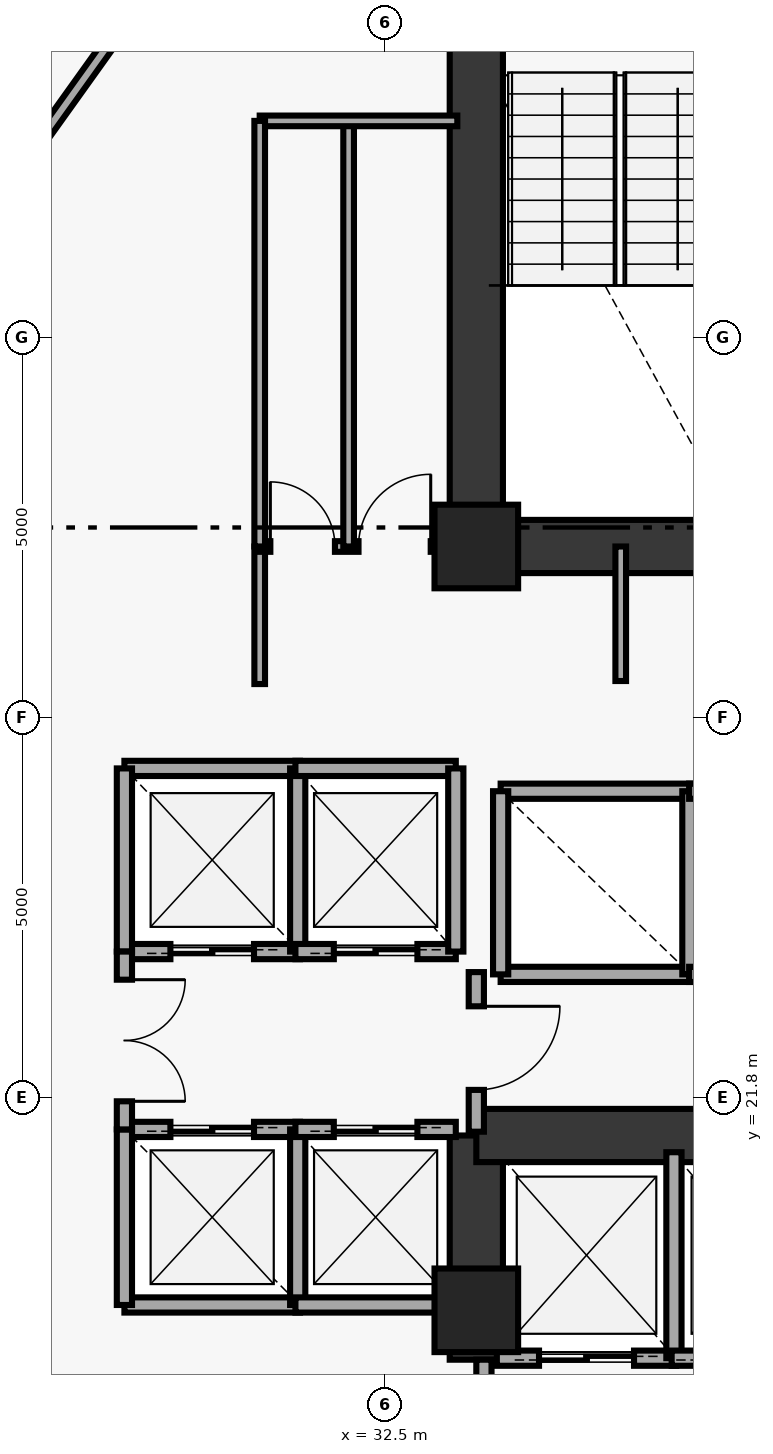
"""IFC4 building model, lengths in metres.
Left out: names, types, materials, properties, quantities, classifications, styles, units other than length and angle.
Written with IfcOpenShell. Run it as: python <this file> out.ifc"""

import sys

from ifc_helpers import new_model, si_unit, direction, frame, frame_2d, origin, origin_2d, place, context, subcontext, project, spatial, rectangle, extrude, element, fill, save


model = new_model("IFC4")
c1 = context("Model", 3, precision=1e-05, world=origin(), true_north=direction((0.0, 1.0)))
c2 = subcontext(c1, "Body", "Model", "MODEL_VIEW")
j1 = project(units=[si_unit("LENGTHUNIT", "METRE"), si_unit("PLANEANGLEUNIT", "RADIAN")], contexts=[c1])
p1 = place(None, origin())
s1 = spatial("IfcSite", under=j1, at=p1, CompositionType="ELEMENT")
p2 = place(p1, origin())
s2 = spatial("IfcBuilding", under=s1, at=p2, CompositionType="ELEMENT")
p3 = place(p2, frame((0.0, 0.0, 106.05)))
s3 = spatial("IfcBuildingStorey", under=s2, at=p3, CompositionType="ELEMENT", Elevation=106.05)
for number, where, z_axis, x_axis in (
    (1, (33.7, 19.0, 0.0), (0.0, 0.0, 1.0), (1.0, 0.0, 0.0)),
    (2, (33.7, 29.05, 0.0), (0.0, 0.0, 1.0), (1.0, 0.0, 0.0)),
):
    element("IfcColumn", number, at=place(p3, frame(where, z_axis=z_axis, x_axis=x_axis)), inside=s3, PredefinedType="PILASTER", context=c2, shape_type="SweptSolid", body=[
        extrude(rectangle(XDim=1.1, YDim=1.1, at=origin_2d()), origin(), (0.0, 0.0, 1.0), 6.88),
    ])
p4 = place(p3, frame((33.7, 29.05, 0.0), z_axis=(0.0, 0.0, 1.0), x_axis=(0.0, 1.0, 0.0)))
e3 = element("IfcWall", 3, at=p4, inside=s3, PredefinedType="SHEAR", context=c2, shape_type="SweptSolid", body=[
    extrude(rectangle(XDim=8.35, YDim=0.7, at=frame_2d((4.175, 0.0))), origin(), (0.0, 0.0, 1.0), 6.88),
])
p5 = place(p3, frame((33.7, 18.35, 0.0), z_axis=(0.0, 0.0, 1.0), x_axis=(0.0, 1.0, 0.0)))
e4 = element("IfcWall", 4, at=p5, inside=s3, PredefinedType="SHEAR", context=c2, shape_type="SweptSolid", body=[
    extrude(rectangle(XDim=2.95, YDim=0.7, at=frame_2d((1.475, 0.0))), origin(), (0.0, 0.0, 1.0), 6.88),
])
p6 = place(p3, frame((33.7, 29.05, 0.0), z_axis=(0.0, 0.0, 1.0), x_axis=(1.0, 0.0, 0.0)))
e5 = element("IfcWall", 5, at=p6, inside=s3, PredefinedType="SHEAR", context=c2, shape_type="SweptSolid", body=[
    extrude(rectangle(XDim=10.6, YDim=0.7, at=frame_2d((5.3, 0.0))), origin(), (0.0, 0.0, 1.0), 6.88),
])
p7 = place(p3, frame((33.7, 21.3, 0.0), z_axis=(0.0, 0.0, 1.0), x_axis=(1.0, 0.0, 0.0)))
e6 = element("IfcWall", 6, at=p7, inside=s3, PredefinedType="SHEAR", context=c2, shape_type="SweptSolid", body=[
    extrude(rectangle(XDim=7.55, YDim=0.7, at=frame_2d((3.775, 0.0))), origin(), (0.0, 0.0, 1.0), 6.88),
])
p8 = place(p3, frame((35.6, 27.28, 0.0), z_axis=(0.0, 0.0, 1.0), x_axis=(0.0, 1.0, 0.0)))
e7 = element("IfcWall", 7, at=p8, inside=s3, PredefinedType="PARTITIONING", context=c2, shape_type="SweptSolid", body=[
    extrude(rectangle(XDim=1.77, YDim=0.14, at=frame_2d((0.885, 0.0))), origin(), (0.0, 0.0, 1.0), 6.88),
])
p9 = place(p3, frame((29.07, 23.72, 0.0), z_axis=(0.0, 0.0, 1.0), x_axis=(1.0, 0.0, 0.0)))
e8 = element("IfcWall", 8, at=p9, inside=s3, PredefinedType="SOLIDWALL", context=c2, shape_type="SweptSolid", body=[
    extrude(rectangle(XDim=2.31, YDim=0.2, at=frame_2d((1.155, 0.0))), origin(), (0.0, 0.0, 1.0), 6.88),
])
p10 = place(p9, frame((0.605, 0.0, 0.0)))
e9 = element("IfcOpeningElement", 9, at=p10, cuts=e8, PredefinedType="OPENING", context=c2, shape_type="SweptSolid", body=[
    extrude(rectangle(XDim=1.1, YDim=2.15, at=frame_2d((0.55, 1.075))), frame((0.0, 0.11, 0.0), z_axis=(0.0, -1.0, 0.0), x_axis=(1.0, 0.0, 0.0)), (0.0, 0.0, 1.0), 0.22),
])
p11 = place(p3, frame((29.07, 26.13, 0.0), z_axis=(0.0, 0.0, 1.0), x_axis=(1.0, 0.0, 0.0)))
e10 = element("IfcWall", 10, at=p11, inside=s3, PredefinedType="SOLIDWALL", context=c2, shape_type="SweptSolid", body=[
    extrude(rectangle(XDim=2.31, YDim=0.2, at=frame_2d((1.155, 0.0))), origin(), (0.0, 0.0, 1.0), 6.88),
])
for number, where, z_axis, x_axis in (
    (11, (29.07, 23.72, 0.0), (0.0, 0.0, 1.0), (0.0, 1.0, 0.0)),
    (12, (31.35, 23.72, 0.0), (0.0, 0.0, 1.0), (0.0, 1.0, 0.0)),
):
    element("IfcWall", number, at=place(p3, frame(where, z_axis=z_axis, x_axis=x_axis)), inside=s3, PredefinedType="SOLIDWALL", context=c2, shape_type="SweptSolid", body=[
        extrude(rectangle(XDim=2.41, YDim=0.2, at=frame_2d((1.205, 0.0))), origin(), (0.0, 0.0, 1.0), 6.88),
    ])
p12 = place(p3, frame((31.32, 23.72, 0.0), z_axis=(0.0, 0.0, 1.0), x_axis=(1.0, 0.0, 0.0)))
e13 = element("IfcWall", 13, at=p12, inside=s3, PredefinedType="SOLIDWALL", context=c2, shape_type="SweptSolid", body=[
    extrude(rectangle(XDim=2.11, YDim=0.2, at=frame_2d((1.055, 0.0))), origin(), (0.0, 0.0, 1.0), 6.88),
])
p13 = place(p12, frame((0.505, 0.0, 0.0)))
e14 = element("IfcOpeningElement", 14, at=p13, cuts=e13, PredefinedType="OPENING", context=c2, shape_type="SweptSolid", body=[
    extrude(rectangle(XDim=1.1, YDim=2.15, at=frame_2d((0.55, 1.075))), frame((0.0, 0.11, 0.0), z_axis=(0.0, -1.0, 0.0), x_axis=(1.0, 0.0, 0.0)), (0.0, 0.0, 1.0), 0.22),
])
p14 = place(p3, frame((31.32, 26.13, 0.0), z_axis=(0.0, 0.0, 1.0), x_axis=(1.0, 0.0, 0.0)))
e15 = element("IfcWall", 15, at=p14, inside=s3, PredefinedType="SOLIDWALL", context=c2, shape_type="SweptSolid", body=[
    extrude(rectangle(XDim=2.11, YDim=0.2, at=frame_2d((1.055, 0.0))), origin(), (0.0, 0.0, 1.0), 6.88),
])
p15 = place(p3, frame((33.43, 23.72, 0.0), z_axis=(0.0, 0.0, 1.0), x_axis=(0.0, 1.0, 0.0)))
e16 = element("IfcWall", 16, at=p15, inside=s3, PredefinedType="SOLIDWALL", context=c2, shape_type="SweptSolid", body=[
    extrude(rectangle(XDim=2.41, YDim=0.2, at=frame_2d((1.205, 0.0))), origin(), (0.0, 0.0, 1.0), 6.88),
])
p16 = place(p3, frame((29.07, 19.07, 0.0), z_axis=(0.0, 0.0, 1.0), x_axis=(1.0, 0.0, 0.0)))
e17 = element("IfcWall", 17, at=p16, inside=s3, PredefinedType="SOLIDWALL", context=c2, shape_type="SweptSolid", body=[
    extrude(rectangle(XDim=2.31, YDim=0.2, at=frame_2d((1.155, 0.0))), origin(), (0.0, 0.0, 1.0), 6.88),
])
p17 = place(p3, frame((29.07, 21.38, 0.0), z_axis=(0.0, 0.0, 1.0), x_axis=(1.0, 0.0, 0.0)))
e18 = element("IfcWall", 18, at=p17, inside=s3, PredefinedType="SOLIDWALL", context=c2, shape_type="SweptSolid", body=[
    extrude(rectangle(XDim=2.31, YDim=0.2, at=frame_2d((1.155, 0.0))), origin(), (0.0, 0.0, 1.0), 6.88),
])
p18 = place(p17, frame((0.605, 0.0, 0.0)))
e19 = element("IfcOpeningElement", 19, at=p18, cuts=e18, PredefinedType="OPENING", context=c2, shape_type="SweptSolid", body=[
    extrude(rectangle(XDim=1.1, YDim=2.15, at=frame_2d((0.55, 1.075))), frame((0.0, 0.11, 0.0), z_axis=(0.0, -1.0, 0.0), x_axis=(1.0, 0.0, 0.0)), (0.0, 0.0, 1.0), 0.22),
])
for number, where, z_axis, x_axis in (
    (20, (29.07, 19.07, 0.0), (0.0, 0.0, 1.0), (0.0, 1.0, 0.0)),
    (21, (31.35, 19.07, 0.0), (0.0, 0.0, 1.0), (0.0, 1.0, 0.0)),
):
    element("IfcWall", number, at=place(p3, frame(where, z_axis=z_axis, x_axis=x_axis)), inside=s3, PredefinedType="SOLIDWALL", context=c2, shape_type="SweptSolid", body=[
        extrude(rectangle(XDim=2.31, YDim=0.2, at=frame_2d((1.155, 0.0))), origin(), (0.0, 0.0, 1.0), 6.88),
    ])
p19 = place(p3, frame((31.32, 19.07, 0.0), z_axis=(0.0, 0.0, 1.0), x_axis=(1.0, 0.0, 0.0)))
e22 = element("IfcWall", 22, at=p19, inside=s3, PredefinedType="SOLIDWALL", context=c2, shape_type="SweptSolid", body=[
    extrude(rectangle(XDim=2.11, YDim=0.2, at=frame_2d((1.055, 0.0))), origin(), (0.0, 0.0, 1.0), 6.88),
])
p20 = place(p3, frame((31.32, 21.38, 0.0), z_axis=(0.0, 0.0, 1.0), x_axis=(1.0, 0.0, 0.0)))
e23 = element("IfcWall", 23, at=p20, inside=s3, PredefinedType="SOLIDWALL", context=c2, shape_type="SweptSolid", body=[
    extrude(rectangle(XDim=2.11, YDim=0.2, at=frame_2d((1.055, 0.0))), origin(), (0.0, 0.0, 1.0), 6.88),
])
p21 = place(p20, frame((0.505, 0.0, 0.0)))
e24 = element("IfcOpeningElement", 24, at=p21, cuts=e23, PredefinedType="OPENING", context=c2, shape_type="SweptSolid", body=[
    extrude(rectangle(XDim=1.1, YDim=2.15, at=frame_2d((0.55, 1.075))), frame((0.0, 0.11, 0.0), z_axis=(0.0, -1.0, 0.0), x_axis=(1.0, 0.0, 0.0)), (0.0, 0.0, 1.0), 0.22),
])
for number, where, z_axis, x_axis in (
    (25, (34.02, 23.42, 0.0), (0.0, 0.0, 1.0), (1.0, 0.0, 0.0)),
    (26, (34.02, 25.83, 0.0), (0.0, 0.0, 1.0), (1.0, 0.0, 0.0)),
):
    element("IfcWall", number, at=place(p3, frame(where, z_axis=z_axis, x_axis=x_axis)), inside=s3, PredefinedType="SOLIDWALL", context=c2, shape_type="SweptSolid", body=[
        extrude(rectangle(XDim=2.5, YDim=0.2, at=frame_2d((1.25, 0.0))), origin(), (0.0, 0.0, 1.0), 6.88),
    ])
for number, where, z_axis, x_axis in (
    (27, (34.02, 23.42, 0.0), (0.0, 0.0, 1.0), (0.0, 1.0, 0.0)),
    (28, (36.51, 23.42, 0.0), (0.0, 0.0, 1.0), (0.0, 1.0, 0.0)),
):
    element("IfcWall", number, at=place(p3, frame(where, z_axis=z_axis, x_axis=x_axis)), inside=s3, PredefinedType="SOLIDWALL", context=c2, shape_type="SweptSolid", body=[
        extrude(rectangle(XDim=2.41, YDim=0.2, at=frame_2d((1.205, 0.0))), origin(), (0.0, 0.0, 1.0), 6.88),
    ])
for number, where, z_axis, x_axis in (
    (29, (36.5, 23.42, 0.0), (0.0, 0.0, 1.0), (1.0, 0.0, 0.0)),
    (30, (36.5, 25.83, 0.0), (0.0, 0.0, 1.0), (1.0, 0.0, 0.0)),
):
    element("IfcWall", number, at=place(p3, frame(where, z_axis=z_axis, x_axis=x_axis)), inside=s3, PredefinedType="SOLIDWALL", context=c2, shape_type="SweptSolid", body=[
        extrude(rectangle(XDim=2.5, YDim=0.2, at=frame_2d((1.25, 0.0))), origin(), (0.0, 0.0, 1.0), 6.88),
    ])
p22 = place(p3, frame((33.97, 18.37, 0.0), z_axis=(0.0, 0.0, 1.0), x_axis=(1.0, 0.0, 0.0)))
e31 = element("IfcWall", 31, at=p22, inside=s3, PredefinedType="SOLIDWALL", context=c2, shape_type="SweptSolid", body=[
    extrude(rectangle(XDim=2.36, YDim=0.2, at=frame_2d((1.18, 0.0))), origin(), (0.0, 0.0, 1.0), 6.88),
])
p23 = place(p22, frame((0.555, 0.0, 0.0)))
e32 = element("IfcOpeningElement", 32, at=p23, cuts=e31, PredefinedType="OPENING", context=c2, shape_type="SweptSolid", body=[
    extrude(rectangle(XDim=1.25, YDim=2.2, at=frame_2d((0.625, 1.1))), frame((0.0, 0.11, 0.0), z_axis=(0.0, -1.0, 0.0), x_axis=(1.0, 0.0, 0.0)), (0.0, 0.0, 1.0), 0.22),
])
p24 = place(p3, frame((36.3, 18.37, 0.0), z_axis=(0.0, 0.0, 1.0), x_axis=(0.0, 1.0, 0.0)))
e33 = element("IfcWall", 33, at=p24, inside=s3, PredefinedType="SOLIDWALL", context=c2, shape_type="SweptSolid", body=[
    extrude(rectangle(XDim=2.71, YDim=0.2, at=frame_2d((1.355, 0.0))), origin(), (0.0, 0.0, 1.0), 6.88),
])
p25 = place(p3, frame((36.27, 18.37, 0.0), z_axis=(0.0, 0.0, 1.0), x_axis=(1.0, 0.0, 0.0)))
e34 = element("IfcWall", 34, at=p25, inside=s3, PredefinedType="SOLIDWALL", context=c2, shape_type="SweptSolid", body=[
    extrude(rectangle(XDim=2.36, YDim=0.2, at=frame_2d((1.18, 0.0))), origin(), (0.0, 0.0, 1.0), 6.88),
])
p26 = place(p25, frame((0.38, 0.0, 0.0)))
e35 = element("IfcOpeningElement", 35, at=p26, cuts=e34, PredefinedType="OPENING", context=c2, shape_type="SweptSolid", body=[
    extrude(rectangle(XDim=1.25, YDim=2.2, at=frame_2d((0.625, 1.1))), frame((0.0, 0.11, 0.0), z_axis=(0.0, -1.0, 0.0), x_axis=(1.0, 0.0, 0.0)), (0.0, 0.0, 1.0), 0.22),
])
p27 = place(p3, frame((29.07, 21.38, 0.0), z_axis=(0.0, 0.0, 1.0), x_axis=(0.0, 1.0, 0.0)))
e36 = element("IfcWall", 36, at=p27, inside=s3, PredefinedType="SOLIDWALL", context=c2, shape_type="SweptSolid", body=[
    extrude(rectangle(XDim=2.34, YDim=0.2, at=frame_2d((1.17, 0.0))), origin(), (0.0, 0.0, 1.0), 6.88),
])
p28 = place(p27, frame((0.37, 0.0, 0.0)))
e37 = element("IfcOpeningElement", 37, at=p28, cuts=e36, PredefinedType="OPENING", context=c2, shape_type="SweptSolid", body=[
    extrude(rectangle(XDim=1.6, YDim=2.2, at=frame_2d((0.8, 1.1))), frame((0.0, 0.11, 0.0), z_axis=(0.0, -1.0, 0.0), x_axis=(1.0, 0.0, 0.0)), (0.0, 0.0, 1.0), 0.22),
])
p29 = place(p3, frame((33.7, 21.35, 0.0), z_axis=(0.0, 0.0, 1.0), x_axis=(0.0, 1.0, 0.0)))
e38 = element("IfcWall", 38, at=p29, inside=s3, PredefinedType="SOLIDWALL", context=c2, shape_type="SweptSolid", body=[
    extrude(rectangle(XDim=2.1, YDim=0.2, at=frame_2d((1.05, 0.0))), origin(), (0.0, 0.0, 1.0), 6.265),
])
p30 = place(p29, frame((0.55, 0.0, 0.0)))
e39 = element("IfcOpeningElement", 39, at=p30, cuts=e38, PredefinedType="OPENING", context=c2, shape_type="SweptSolid", body=[
    extrude(rectangle(XDim=1.1, YDim=2.15, at=frame_2d((0.55, 1.075))), frame((0.0, 0.11, 0.0), z_axis=(0.0, -1.0, 0.0), x_axis=(1.0, 0.0, 0.0)), (0.0, 0.0, 1.0), 0.22),
])
p31 = place(p3, frame((33.8, 15.55, 0.0), z_axis=(0.0, 0.0, 1.0), x_axis=(0.0, 1.0, 0.0)))
e40 = element("IfcWall", 40, at=p31, inside=s3, PredefinedType="SOLIDWALL", context=c2, shape_type="SweptSolid", body=[
    extrude(rectangle(XDim=2.8, YDim=0.2, at=frame_2d((1.4, 0.0))), origin(), (0.0, 0.0, 1.0), 6.88),
])
p32 = place(p3, frame((30.85, 27.24, 0.0), z_axis=(0.0, 0.0, 1.0), x_axis=(0.0, 1.0, 0.0)))
e41 = element("IfcWall", 41, at=p32, inside=s3, PredefinedType="PARTITIONING", context=c2, shape_type="SweptSolid", body=[
    extrude(rectangle(XDim=1.81, YDim=0.14, at=frame_2d((0.905, 0.0))), origin(), (0.0, 0.0, 1.0), 6.88),
])
p33 = place(p3, frame((30.85, 29.05, 0.0), z_axis=(0.0, 0.0, 1.0), x_axis=(1.0, 0.0, 0.0)))
e42 = element("IfcWall", 42, at=p33, inside=s3, PredefinedType="PARTITIONING", context=c2, shape_type="SweptSolid", body=[
    extrude(rectangle(XDim=2.43, YDim=0.14, at=frame_2d((1.215, 0.0))), origin(), (0.0, 0.0, 1.0), 4.88),
])
p34 = place(p33, frame((0.14, 0.0, 0.0)))
e43 = element("IfcOpeningElement", 43, at=p34, cuts=e42, PredefinedType="OPENING", context=c2, shape_type="SweptSolid", body=[
    extrude(rectangle(XDim=0.85, YDim=2.1, at=frame_2d((0.425, 1.05))), frame((0.0, 0.08, 0.0), z_axis=(0.0, -1.0, 0.0), x_axis=(1.0, 0.0, 0.0)), (0.0, 0.0, 1.0), 0.16),
])
p35 = place(p33, frame((1.3, 0.0, 0.0)))
e44 = element("IfcOpeningElement", 44, at=p35, cuts=e42, PredefinedType="OPENING", context=c2, shape_type="SweptSolid", body=[
    extrude(rectangle(XDim=0.95, YDim=2.1, at=frame_2d((0.475, 1.05))), frame((0.0, 0.08, 0.0), z_axis=(0.0, -1.0, 0.0), x_axis=(1.0, 0.0, 0.0)), (0.0, 0.0, 1.0), 0.16),
])
p36 = place(p3, frame((32.02, 29.05, 0.0), z_axis=(0.0, 0.0, 1.0), x_axis=(0.0, 1.0, 0.0)))
e45 = element("IfcWall", 45, at=p36, inside=s3, PredefinedType="PARTITIONING", context=c2, shape_type="SweptSolid", body=[
    extrude(rectangle(XDim=5.6, YDim=0.14, at=frame_2d((2.8, 0.0))), origin(), (0.0, 0.0, 1.0), 6.88),
])
p37 = place(p3, frame((30.85, 34.65, 0.0), z_axis=(0.0, 0.0, 1.0), x_axis=(1.0, 0.0, 0.0)))
e46 = element("IfcWall", 46, at=p37, inside=s3, PredefinedType="PARTITIONING", context=c2, shape_type="SweptSolid", body=[
    extrude(rectangle(XDim=2.6, YDim=0.14, at=frame_2d((1.3, 0.0))), origin(), (0.0, 0.0, 1.0), 6.88),
])
p38 = place(p3, frame((30.85, 29.05, 0.0), z_axis=(0.0, 0.0, 1.0), x_axis=(0.0, 1.0, 0.0)))
e47 = element("IfcWall", 47, at=p38, inside=s3, PredefinedType="PARTITIONING", context=c2, shape_type="SweptSolid", body=[
    extrude(rectangle(XDim=5.6, YDim=0.14, at=frame_2d((2.8, 0.0))), origin(), (0.0, 0.0, 1.0), 6.88),
])
p39 = place(p3, frame((32.281, 40.436, 0.0), z_axis=(0.0, 0.0, 1.0), x_axis=(-0.581884927471, -0.813271130179, 0.0)))
e48 = element("IfcWall", 48, at=p39, inside=s3, PredefinedType="PARTITIONING", context=c2, shape_type="SweptSolid", body=[
    extrude(rectangle(XDim=7.532, YDim=0.16, at=frame_2d((3.766, 0.0))), origin(), (0.0, 0.0, 1.0), 6.88),
])
p40 = place(p3, frame((25.663, 22.614, 0.0), z_axis=(0.0, 0.0, 1.0), x_axis=(0.449672541353, -0.893193487187, 0.0)))
e49 = element("IfcWall", 49, at=p40, inside=s3, PredefinedType="PARTITIONING", context=c2, shape_type="SweptSolid", body=[
    extrude(rectangle(XDim=8.057, YDim=0.16, at=frame_2d((4.028, 0.0))), origin(), (0.0, 0.0, 1.0), 6.88),
])
p41 = place(p10, origin())
e50 = element("IfcDoor", 50, at=p41, inside=s3, OperationType="DOUBLE_DOOR_SLIDING", PredefinedType="DOOR", context=c2, shape_type="SweptSolid", body=[
    extrude(rectangle(XDim=1.1, YDim=2.15, at=frame_2d((0.55, 1.075))), frame((0.0, 0.025, 0.0), z_axis=(0.0, -1.0, 0.0), x_axis=(1.0, 0.0, 0.0)), (0.0, 0.0, 1.0), 0.05),
])
fill(e9, e50)
p42 = place(p13, origin())
e51 = element("IfcDoor", 51, at=p42, inside=s3, OperationType="DOUBLE_DOOR_SLIDING", PredefinedType="DOOR", context=c2, shape_type="SweptSolid", body=[
    extrude(rectangle(XDim=1.1, YDim=2.15, at=frame_2d((0.55, 1.075))), frame((0.0, 0.025, 0.0), z_axis=(0.0, -1.0, 0.0), x_axis=(1.0, 0.0, 0.0)), (0.0, 0.0, 1.0), 0.05),
])
fill(e14, e51)
p43 = place(p18, origin())
e52 = element("IfcDoor", 52, at=p43, inside=s3, OperationType="DOUBLE_DOOR_SLIDING", PredefinedType="DOOR", context=c2, shape_type="SweptSolid", body=[
    extrude(rectangle(XDim=1.1, YDim=2.15, at=frame_2d((0.55, 1.075))), frame((0.0, 0.025, 0.0), z_axis=(0.0, -1.0, 0.0), x_axis=(1.0, 0.0, 0.0)), (0.0, 0.0, 1.0), 0.05),
])
fill(e19, e52)
p44 = place(p21, origin())
e53 = element("IfcDoor", 53, at=p44, inside=s3, OperationType="DOUBLE_DOOR_SLIDING", PredefinedType="DOOR", context=c2, shape_type="SweptSolid", body=[
    extrude(rectangle(XDim=1.1, YDim=2.15, at=frame_2d((0.55, 1.075))), frame((0.0, 0.025, 0.0), z_axis=(0.0, -1.0, 0.0), x_axis=(1.0, 0.0, 0.0)), (0.0, 0.0, 1.0), 0.05),
])
fill(e24, e53)
p45 = place(p23, origin())
e54 = element("IfcDoor", 54, at=p45, inside=s3, OperationType="DOUBLE_DOOR_SLIDING", PredefinedType="DOOR", context=c2, shape_type="SweptSolid", body=[
    extrude(rectangle(XDim=1.25, YDim=2.2, at=frame_2d((0.625, 1.1))), frame((0.0, 0.025, 0.0), z_axis=(0.0, -1.0, 0.0), x_axis=(1.0, 0.0, 0.0)), (0.0, 0.0, 1.0), 0.05),
])
fill(e32, e54)
p46 = place(p28, origin())
e55 = element("IfcDoor", 55, at=p46, inside=s3, OperationType="DOUBLE_DOOR_SINGLE_SWING", PredefinedType="DOOR", context=c2, shape_type="SweptSolid", body=[
    extrude(rectangle(XDim=1.6, YDim=2.2, at=frame_2d((0.8, 1.1))), frame((0.0, 0.025, 0.0), z_axis=(0.0, -1.0, 0.0), x_axis=(1.0, 0.0, 0.0)), (0.0, 0.0, 1.0), 0.05),
])
fill(e37, e55)
p47 = place(p30, origin())
e56 = element("IfcDoor", 56, at=p47, inside=s3, OperationType="SINGLE_SWING_RIGHT", PredefinedType="DOOR", context=c2, shape_type="SweptSolid", body=[
    extrude(rectangle(XDim=1.1, YDim=2.15, at=frame_2d((0.55, 1.075))), frame((0.0, 0.025, 0.0), z_axis=(0.0, -1.0, 0.0), x_axis=(1.0, 0.0, 0.0)), (0.0, 0.0, 1.0), 0.05),
])
fill(e39, e56)
p48 = place(p34, origin())
e57 = element("IfcDoor", 57, at=p48, inside=s3, OperationType="SINGLE_SWING_LEFT", PredefinedType="DOOR", context=c2, shape_type="SweptSolid", body=[
    extrude(rectangle(XDim=0.85, YDim=2.1, at=frame_2d((0.425, 1.05))), frame((0.0, 0.025, 0.0), z_axis=(0.0, -1.0, 0.0), x_axis=(1.0, 0.0, 0.0)), (0.0, 0.0, 1.0), 0.05),
])
fill(e43, e57)
p49 = place(p35, origin())
e58 = element("IfcDoor", 58, at=p49, inside=s3, OperationType="SINGLE_SWING_RIGHT", PredefinedType="DOOR", context=c2, shape_type="SweptSolid", body=[
    extrude(rectangle(XDim=0.95, YDim=2.1, at=frame_2d((0.475, 1.05))), frame((0.0, 0.025, 0.0), z_axis=(0.0, -1.0, 0.0), x_axis=(1.0, 0.0, 0.0)), (0.0, 0.0, 1.0), 0.05),
])
fill(e44, e58)
save(model, sys.argv[1])
